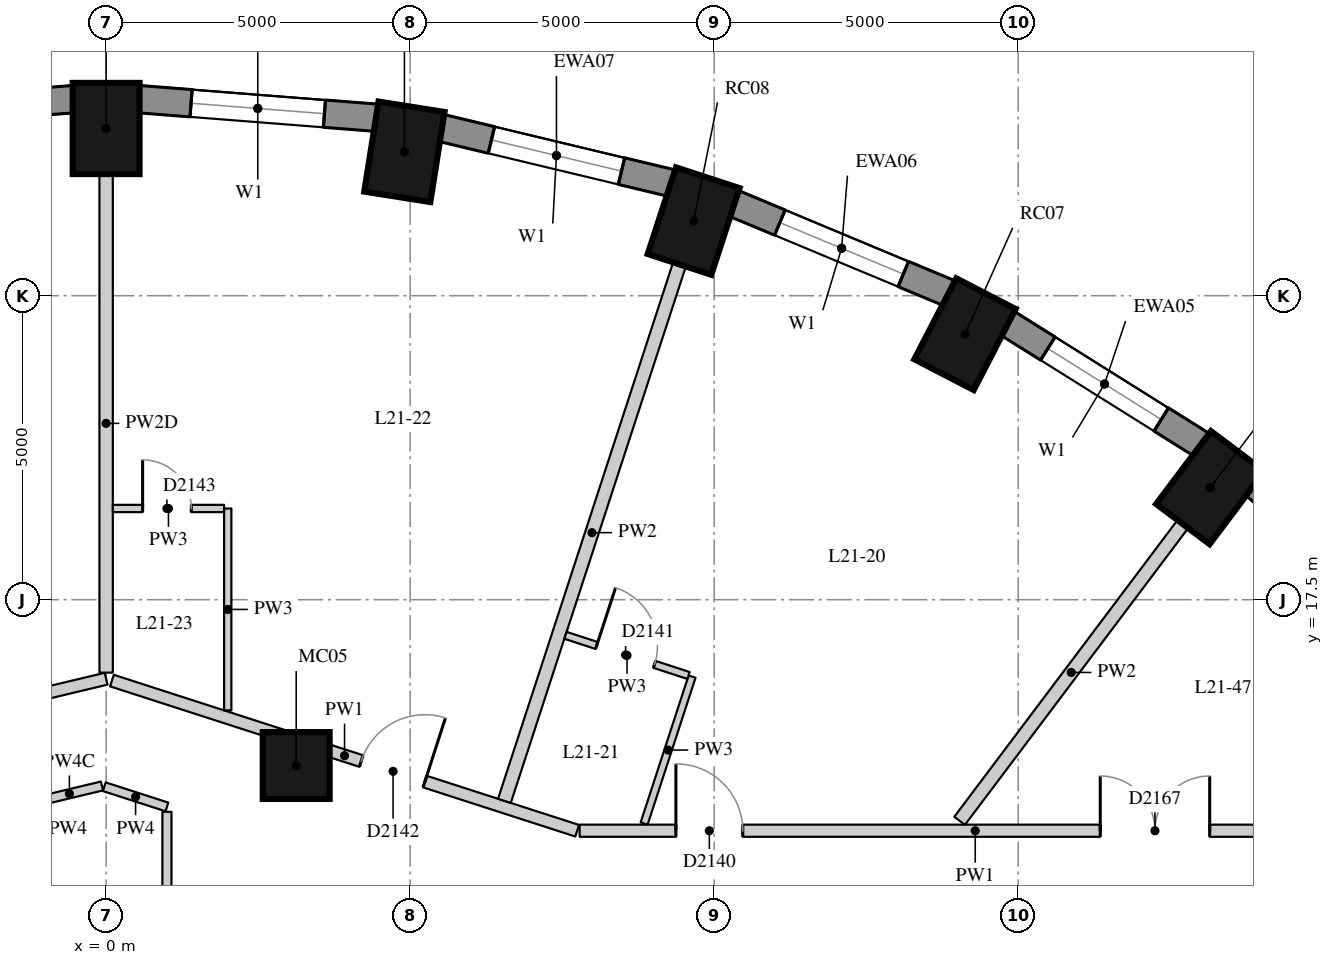
"""IFC4 building model, lengths in metres.
Left out: names, types, materials, properties, quantities, classifications, styles, units other than length and angle.
Written with IfcOpenShell. Run it as: python <this file> out.ifc"""

import sys

from ifc_helpers import new_model, si_unit, direction, frame, frame_2d, origin, origin_2d, place, context, subcontext, project, spatial, rectangle, extrude, element, fill, save


model = new_model("IFC4")
c1 = context("Model", 3, precision=1e-05, world=origin(), true_north=direction((0.0, 1.0)))
c2 = subcontext(c1, "Body", "Model", "MODEL_VIEW")
j1 = project(units=[si_unit("LENGTHUNIT", "METRE"), si_unit("PLANEANGLEUNIT", "RADIAN")], contexts=[c1])
p1 = place(None, origin())
s1 = spatial("IfcSite", under=j1, at=p1, CompositionType="ELEMENT")
p2 = place(p1, origin())
s2 = spatial("IfcBuilding", under=s1, at=p2, CompositionType="ELEMENT")
p3 = place(p2, frame((0.0, 0.0, 77.8)))
s3 = spatial("IfcBuildingStorey", under=s2, at=p3, CompositionType="ELEMENT", Elevation=77.8)
for number, where, z_axis, x_axis in (
    (1, (18.159, 19.343, 0.0), (0.0, 0.0, 1.0), (0.601, 0.799, 0.0)),
    (2, (14.125, 21.867, 0.0), (0.0, 0.0, 1.0), (0.46, 0.888, 0.0)),
    (3, (9.662, 23.727, 0.0), (0.0, 0.0, 1.0), (0.31, 0.951, 0.0)),
    (4, (4.906, 24.866, 0.0), (0.0, 0.0, 1.0), (0.156, 0.988, 0.0)),
    (5, (0.0, 25.25, 0.0), (0.0, 0.0, 1.0), (0.0, 1.0, 0.0)),
):
    element("IfcColumn", number, at=place(p3, frame(where, z_axis=z_axis, x_axis=x_axis)), inside=s3, PredefinedType="COLUMN", context=c2, shape_type="SweptSolid", body=[
        extrude(rectangle(XDim=1.5, YDim=1.1, at=origin_2d()), origin(), (0.0, 0.0, 1.0), 3.3),
    ])
p4 = place(p3, frame((3.126, 14.772, 0.0), z_axis=(0.0, 0.0, 1.0), x_axis=(1.0, 0.0, 0.0)))
e6 = element("IfcColumn", 6, at=p4, inside=s3, PredefinedType="COLUMN", context=c2, shape_type="SweptSolid", body=[
    extrude(rectangle(XDim=1.1, YDim=1.1, at=origin_2d()), origin(), (0.0, 0.0, 1.0), 3.3),
])
p5 = place(p3, frame((21.627, 16.943, 0.0), z_axis=(0.0, 0.0, 1.0), x_axis=(-0.745526233716, 0.66647628228, 0.0)))
e7 = element("IfcWall", 7, at=p5, inside=s3, PredefinedType="SOLIDWALL", context=c2, shape_type="SweptSolid", body=[
    extrude(rectangle(XDim=3.697, YDim=0.45, at=frame_2d((1.848, 0.0))), origin(), (0.0, 0.0, 1.0), 3.02),
])
p6 = place(p3, frame((18.023, 20.044, 0.0), z_axis=(0.0, 0.0, 1.0), x_axis=(-0.847635480093, 0.530579016629, 0.0)))
e8 = element("IfcWall", 8, at=p6, inside=s3, PredefinedType="SOLIDWALL", context=c2, shape_type="SweptSolid", body=[
    extrude(rectangle(XDim=3.782, YDim=0.45, at=frame_2d((1.891, 0.0))), origin(), (0.0, 0.0, 1.0), 3.02),
])
p7 = place(p6, frame((0.791, 0.0, 0.4)))
e9 = element("IfcOpeningElement", 9, at=p7, cuts=e8, PredefinedType="OPENING", context=c2, shape_type="SweptSolid", body=[
    extrude(rectangle(XDim=2.2, YDim=1.75, at=frame_2d((1.1, 0.875))), frame((0.0, 0.235, 0.0), z_axis=(0.0, -1.0, 0.0), x_axis=(1.0, 0.0, 0.0)), (0.0, 0.0, 1.0), 0.47),
])
p8 = place(p3, frame((13.875, 22.537, 0.0), z_axis=(0.0, 0.0, 1.0), x_axis=(-0.923031964282, 0.384723267966, 0.0)))
e10 = element("IfcWall", 10, at=p8, inside=s3, PredefinedType="SOLIDWALL", context=c2, shape_type="SweptSolid", body=[
    extrude(rectangle(XDim=3.856, YDim=0.45, at=frame_2d((1.928, 0.0))), origin(), (0.0, 0.0, 1.0), 3.02),
])
p9 = place(p8, frame((0.828, 0.0, 0.4)))
e11 = element("IfcOpeningElement", 11, at=p9, cuts=e10, PredefinedType="OPENING", context=c2, shape_type="SweptSolid", body=[
    extrude(rectangle(XDim=2.2, YDim=1.75, at=frame_2d((1.1, 0.875))), frame((0.0, 0.235, 0.0), z_axis=(0.0, -1.0, 0.0), x_axis=(1.0, 0.0, 0.0)), (0.0, 0.0, 1.0), 0.47),
])
p10 = place(p3, frame((9.308, 24.35, 0.0), z_axis=(0.0, 0.0, 1.0), x_axis=(-0.972496561493, 0.232917233979, 0.0)))
e12 = element("IfcWall", 12, at=p10, inside=s3, PredefinedType="SOLIDWALL", context=c2, shape_type="SweptSolid", body=[
    extrude(rectangle(XDim=3.911, YDim=0.45, at=frame_2d((1.956, 0.0))), origin(), (0.0, 0.0, 1.0), 3.02),
])
p11 = place(p10, frame((0.855, 0.0, 0.4)))
e13 = element("IfcOpeningElement", 13, at=p11, cuts=e12, PredefinedType="OPENING", context=c2, shape_type="SweptSolid", body=[
    extrude(rectangle(XDim=2.2, YDim=1.75, at=frame_2d((1.1, 0.875))), frame((0.0, 0.235, 0.0), z_axis=(0.0, -1.0, 0.0), x_axis=(1.0, 0.0, 0.0)), (0.0, 0.0, 1.0), 0.47),
])
p12 = place(p3, frame((4.457, 25.426, 0.0), z_axis=(0.0, 0.0, 1.0), x_axis=(-0.996955972145, 0.077966592873, 0.0)))
e14 = element("IfcWall", 14, at=p12, inside=s3, PredefinedType="SOLIDWALL", context=c2, shape_type="SweptSolid", body=[
    extrude(rectangle(XDim=3.939, YDim=0.45, at=frame_2d((1.97, 0.0))), origin(), (0.0, 0.0, 1.0), 3.02),
])
p13 = place(p12, frame((0.87, 0.0, 0.4)))
e15 = element("IfcOpeningElement", 15, at=p13, cuts=e14, PredefinedType="OPENING", context=c2, shape_type="SweptSolid", body=[
    extrude(rectangle(XDim=2.2, YDim=1.75, at=frame_2d((1.1, 0.875))), frame((0.0, 0.235, 0.0), z_axis=(0.0, -1.0, 0.0), x_axis=(1.0, 0.0, 0.0)), (0.0, 0.0, 1.0), 0.47),
])
p14 = place(p3, frame((-0.53, 25.733, 0.0), z_axis=(0.0, 0.0, 1.0), x_axis=(-0.996955972145, -0.077966592873, 0.0)))
e16 = element("IfcWall", 16, at=p14, inside=s3, PredefinedType="SOLIDWALL", context=c2, shape_type="SweptSolid", body=[
    extrude(rectangle(XDim=3.939, YDim=0.45, at=frame_2d((1.97, 0.0))), origin(), (0.0, 0.0, 1.0), 3.02),
])
p15 = place(p14, frame((0.87, 0.0, 0.4)))
e17 = element("IfcOpeningElement", 17, at=p15, cuts=e16, PredefinedType="OPENING", context=c2, shape_type="SweptSolid", body=[
    extrude(rectangle(XDim=2.2, YDim=1.75, at=frame_2d((1.1, 0.875))), frame((0.0, 0.235, 0.0), z_axis=(0.0, -1.0, 0.0), x_axis=(1.0, 0.0, 0.0)), (0.0, 0.0, 1.0), 0.47),
])
p16 = place(p3, frame((-7.683, 14.365, 0.0), z_axis=(0.0, 0.0, 1.0), x_axis=(0.972657109353, 0.23224587752, 0.0)))
e18 = element("IfcWall", 18, at=p16, inside=s3, PredefinedType="PARTITIONING", context=c2, shape_type="SweptSolid", body=[
    extrude(rectangle(XDim=7.899, YDim=0.2, at=frame_2d((3.949, 0.0))), origin(), (0.0, 0.0, 1.0), 2.57),
])
p17 = place(p16, frame((0.22, 0.0, 0.0)))
e19 = element("IfcOpeningElement", 19, at=p17, cuts=e18, PredefinedType="OPENING", context=c2, shape_type="SweptSolid", body=[
    extrude(rectangle(XDim=1.1, YDim=2.1, at=frame_2d((0.55, 1.05))), frame((0.0, 0.11, 0.0), z_axis=(0.0, -1.0, 0.0), x_axis=(1.0, 0.0, 0.0)), (0.0, 0.0, 1.0), 0.22),
])
p18 = place(p3, frame((0.095, 16.169, 0.0), z_axis=(0.0, 0.0, 1.0), x_axis=(0.951667112614, -0.307131416122, 0.0)))
e20 = element("IfcWall", 20, at=p18, inside=s3, PredefinedType="PARTITIONING", context=c2, shape_type="SweptSolid", body=[
    extrude(rectangle(XDim=8.041, YDim=0.2, at=frame_2d((4.02, 0.0))), origin(), (0.0, 0.0, 1.0), 3.02),
])
p19 = place(p18, frame((4.309, 0.0, 0.0)))
e21 = element("IfcOpeningElement", 21, at=p19, cuts=e20, PredefinedType="OPENING", context=c2, shape_type="SweptSolid", body=[
    extrude(rectangle(XDim=1.1, YDim=2.1, at=frame_2d((0.55, 1.05))), frame((0.0, 0.11, 0.0), z_axis=(0.0, -1.0, 0.0), x_axis=(1.0, 0.0, 0.0)), (0.0, 0.0, 1.0), 0.22),
])
p20 = place(p3, frame((7.787, 13.7, 0.0), z_axis=(0.0, 0.0, 1.0), x_axis=(1.0, 0.0, 0.0)))
e22 = element("IfcWall", 22, at=p20, inside=s3, PredefinedType="PARTITIONING", context=c2, shape_type="SweptSolid", body=[
    extrude(rectangle(XDim=13.013, YDim=0.2, at=frame_2d((6.506, 0.0))), origin(), (0.0, 0.0, 1.0), 3.02),
])
p21 = place(p20, frame((1.583, 0.0, 0.0)))
e23 = element("IfcOpeningElement", 23, at=p21, cuts=e22, PredefinedType="OPENING", context=c2, shape_type="SweptSolid", body=[
    extrude(rectangle(XDim=1.1, YDim=2.1, at=frame_2d((0.55, 1.05))), frame((0.0, 0.11, 0.0), z_axis=(0.0, -1.0, 0.0), x_axis=(1.0, 0.0, 0.0)), (0.0, 0.0, 1.0), 0.22),
])
p22 = place(p20, frame((8.562, 0.0, 0.0)))
e24 = element("IfcOpeningElement", 24, at=p22, cuts=e22, PredefinedType="OPENING", context=c2, shape_type="SweptSolid", body=[
    extrude(rectangle(XDim=1.8, YDim=2.1, at=frame_2d((0.9, 1.05))), frame((0.0, 0.11, 0.0), z_axis=(0.0, -1.0, 0.0), x_axis=(1.0, 0.0, 0.0)), (0.0, 0.0, 1.0), 0.22),
])
p23 = place(p3, frame((-1.14, 14.18, 0.0), z_axis=(0.0, 0.0, 1.0), x_axis=(0.972668158826, 0.232199596913, 0.0)))
e25 = element("IfcWall", 25, at=p23, inside=s3, PredefinedType="PARTITIONING", context=c2, shape_type="SweptSolid", body=[
    extrude(rectangle(XDim=1.102, YDim=0.15, at=frame_2d((0.551, 0.0))), origin(), (0.0, 0.0, 1.0), 2.42),
])
p24 = place(p3, frame((-0.031, 14.424, 0.0), z_axis=(0.0, 0.0, 1.0), x_axis=(0.951683114319, -0.307081829354, 0.0)))
e26 = element("IfcWall", 26, at=p24, inside=s3, PredefinedType="PARTITIONING", context=c2, shape_type="SweptSolid", body=[
    extrude(rectangle(XDim=1.083, YDim=0.15, at=frame_2d((0.542, 0.0))), origin(), (0.0, 0.0, 1.0), 3.02),
])
p25 = place(p3, frame((1.0, 14.011, 0.0), z_axis=(0.0, 0.0, 1.0), x_axis=(0.0, -1.0, 0.0)))
e27 = element("IfcWall", 27, at=p25, inside=s3, PredefinedType="PARTITIONING", context=c2, shape_type="SweptSolid", body=[
    extrude(rectangle(XDim=4.861, YDim=0.15, at=frame_2d((2.431, 0.0))), origin(), (0.0, 0.0, 1.0), 3.02),
])
p26 = place(p3, frame((17.708, 18.743, 0.0), z_axis=(0.0, 0.0, 1.0), x_axis=(-0.601170031872, -0.799121137738, 0.0)))
e28 = element("IfcWall", 28, at=p26, inside=s3, PredefinedType="PARTITIONING", context=c2, shape_type="SweptSolid", body=[
    extrude(rectangle(XDim=6.106, YDim=0.22, at=frame_2d((3.053, 0.0))), origin(), (0.0, 0.0, 1.0), 3.02),
])
p27 = place(p3, frame((9.429, 23.014, 0.0), z_axis=(0.0, 0.0, 1.0), x_axis=(-0.310223734739, -0.950663575827, 0.0)))
e29 = element("IfcWall", 29, at=p27, inside=s3, PredefinedType="PARTITIONING", context=c2, shape_type="SweptSolid", body=[
    extrude(rectangle(XDim=9.281, YDim=0.22, at=frame_2d((4.64, 0.0))), origin(), (0.0, 0.0, 1.0), 3.02),
])
p28 = place(p3, frame((0.0, 24.5, 0.0), z_axis=(0.0, 0.0, 1.0), x_axis=(0.0, -1.0, 0.0)))
e30 = element("IfcWall", 30, at=p28, inside=s3, PredefinedType="PARTITIONING", context=c2, shape_type="SweptSolid", body=[
    extrude(rectangle(XDim=8.2, YDim=0.22, at=frame_2d((4.1, 0.0))), origin(), (0.0, 0.0, 1.0), 2.47),
])
p29 = place(p3, frame((8.848, 13.819, 0.0), z_axis=(0.0, 0.0, 1.0), x_axis=(0.310254704997, 0.95065346895, 0.0)))
e31 = element("IfcWall", 31, at=p29, inside=s3, PredefinedType="PARTITIONING", context=c2, shape_type="SweptSolid", body=[
    extrude(rectangle(XDim=2.541, YDim=0.12, at=frame_2d((1.271, 0.0))), origin(), (0.0, 0.0, 1.0), 3.02),
])
p30 = place(p3, frame((2.0, 15.68, 0.0), z_axis=(0.0, 0.0, 1.0), x_axis=(0.0, 1.0, 0.0)))
e32 = element("IfcWall", 32, at=p30, inside=s3, PredefinedType="PARTITIONING", context=c2, shape_type="SweptSolid", body=[
    extrude(rectangle(XDim=3.32, YDim=0.12, at=frame_2d((1.66, 0.0))), origin(), (0.0, 0.0, 1.0), 3.02),
])
p31 = place(p3, frame((9.579, 16.253, 0.0), z_axis=(0.0, 0.0, 1.0), x_axis=(-0.950613738429, 0.310376417129, 0.0)))
e33 = element("IfcWall", 33, at=p31, inside=s3, PredefinedType="PARTITIONING", context=c2, shape_type="SweptSolid", body=[
    extrude(rectangle(XDim=2.13, YDim=0.12, at=frame_2d((1.065, 0.0))), origin(), (0.0, 0.0, 1.0), 3.02),
])
p32 = place(p31, frame((0.59, 0.0, 0.0)))
e34 = element("IfcOpeningElement", 34, at=p32, cuts=e33, PredefinedType="OPENING", context=c2, shape_type="SweptSolid", body=[
    extrude(rectangle(XDim=1.0, YDim=2.1, at=frame_2d((0.5, 1.05))), frame((0.0, 0.07, 0.0), z_axis=(0.0, -1.0, 0.0), x_axis=(1.0, 0.0, 0.0)), (0.0, 0.0, 1.0), 0.14),
])
p33 = place(p3, frame((1.94, 19.0, 0.0), z_axis=(0.0, 0.0, 1.0), x_axis=(-1.0, 0.0, 0.0)))
e35 = element("IfcWall", 35, at=p33, inside=s3, PredefinedType="PARTITIONING", context=c2, shape_type="SweptSolid", body=[
    extrude(rectangle(XDim=1.83, YDim=0.12, at=frame_2d((0.915, 0.0))), origin(), (0.0, 0.0, 1.0), 3.02),
])
p34 = place(p33, frame((0.54, 0.0, 0.0)))
e36 = element("IfcOpeningElement", 36, at=p34, cuts=e35, PredefinedType="OPENING", context=c2, shape_type="SweptSolid", body=[
    extrude(rectangle(XDim=0.8, YDim=2.1, at=frame_2d((0.4, 1.05))), frame((0.0, 0.07, 0.0), z_axis=(0.0, -1.0, 0.0), x_axis=(1.0, 0.0, 0.0)), (0.0, 0.0, 1.0), 0.14),
])
p35 = place(p7, origin())
e37 = element("IfcWindow", 37, at=p35, inside=s3, PartitioningType="SINGLE_PANEL", PredefinedType="WINDOW", context=c2, shape_type="SweptSolid", body=[
    extrude(rectangle(XDim=2.2, YDim=1.75, at=frame_2d((1.1, 0.875))), frame((0.0, 0.035, 0.0), z_axis=(0.0, -1.0, 0.0), x_axis=(1.0, 0.0, 0.0)), (0.0, 0.0, 1.0), 0.06),
])
fill(e9, e37)
p36 = place(p9, origin())
e38 = element("IfcWindow", 38, at=p36, inside=s3, PartitioningType="SINGLE_PANEL", PredefinedType="WINDOW", context=c2, shape_type="SweptSolid", body=[
    extrude(rectangle(XDim=2.2, YDim=1.75, at=frame_2d((1.1, 0.875))), frame((0.0, 0.035, 0.0), z_axis=(0.0, -1.0, 0.0), x_axis=(1.0, 0.0, 0.0)), (0.0, 0.0, 1.0), 0.06),
])
fill(e11, e38)
p37 = place(p11, origin())
e39 = element("IfcWindow", 39, at=p37, inside=s3, PartitioningType="SINGLE_PANEL", PredefinedType="WINDOW", context=c2, shape_type="SweptSolid", body=[
    extrude(rectangle(XDim=2.2, YDim=1.75, at=frame_2d((1.1, 0.875))), frame((0.0, 0.035, 0.0), z_axis=(0.0, -1.0, 0.0), x_axis=(1.0, 0.0, 0.0)), (0.0, 0.0, 1.0), 0.06),
])
fill(e13, e39)
p38 = place(p13, origin())
e40 = element("IfcWindow", 40, at=p38, inside=s3, PartitioningType="SINGLE_PANEL", PredefinedType="WINDOW", context=c2, shape_type="SweptSolid", body=[
    extrude(rectangle(XDim=2.2, YDim=1.75, at=frame_2d((1.1, 0.875))), frame((0.0, 0.035, 0.0), z_axis=(0.0, -1.0, 0.0), x_axis=(1.0, 0.0, 0.0)), (0.0, 0.0, 1.0), 0.06),
])
fill(e15, e40)
p39 = place(p21, origin())
e41 = element("IfcDoor", 41, at=p39, inside=s3, OperationType="SINGLE_SWING_LEFT", PredefinedType="DOOR", context=c2, shape_type="SweptSolid", body=[
    extrude(rectangle(XDim=1.1, YDim=2.1, at=frame_2d((0.55, 1.05))), frame((0.0, 0.025, 0.0), z_axis=(0.0, -1.0, 0.0), x_axis=(1.0, 0.0, 0.0)), (0.0, 0.0, 1.0), 0.05),
])
fill(e23, e41)
p40 = place(p32, origin())
e42 = element("IfcDoor", 42, at=p40, inside=s3, OperationType="SINGLE_SWING_LEFT", PredefinedType="DOOR", context=c2, shape_type="SweptSolid", body=[
    extrude(rectangle(XDim=1.0, YDim=2.1, at=frame_2d((0.5, 1.05))), frame((0.0, 0.025, 0.0), z_axis=(0.0, -1.0, 0.0), x_axis=(1.0, 0.0, 0.0)), (0.0, 0.0, 1.0), 0.05),
])
fill(e34, e42)
p41 = place(p19, origin())
e43 = element("IfcDoor", 43, at=p41, inside=s3, OperationType="SINGLE_SWING_RIGHT", PredefinedType="DOOR", context=c2, shape_type="SweptSolid", body=[
    extrude(rectangle(XDim=1.1, YDim=2.1, at=frame_2d((0.55, 1.05))), frame((0.0, 0.025, 0.0), z_axis=(0.0, -1.0, 0.0), x_axis=(1.0, 0.0, 0.0)), (0.0, 0.0, 1.0), 0.05),
])
fill(e21, e43)
p42 = place(p34, origin())
e44 = element("IfcDoor", 44, at=p42, inside=s3, OperationType="SINGLE_SWING_LEFT", PredefinedType="DOOR", context=c2, shape_type="SweptSolid", body=[
    extrude(rectangle(XDim=0.8, YDim=2.1, at=frame_2d((0.4, 1.05))), frame((0.0, 0.025, 0.0), z_axis=(0.0, -1.0, 0.0), x_axis=(1.0, 0.0, 0.0)), (0.0, 0.0, 1.0), 0.05),
])
fill(e36, e44)
p43 = place(p22, origin())
e45 = element("IfcDoor", 45, at=p43, inside=s3, OperationType="DOUBLE_DOOR_SINGLE_SWING", PredefinedType="DOOR", context=c2, shape_type="SweptSolid", body=[
    extrude(rectangle(XDim=1.8, YDim=2.1, at=frame_2d((0.9, 1.05))), frame((0.0, 0.025, 0.0), z_axis=(0.0, -1.0, 0.0), x_axis=(1.0, 0.0, 0.0)), (0.0, 0.0, 1.0), 0.05),
])
fill(e24, e45)
save(model, sys.argv[1])
